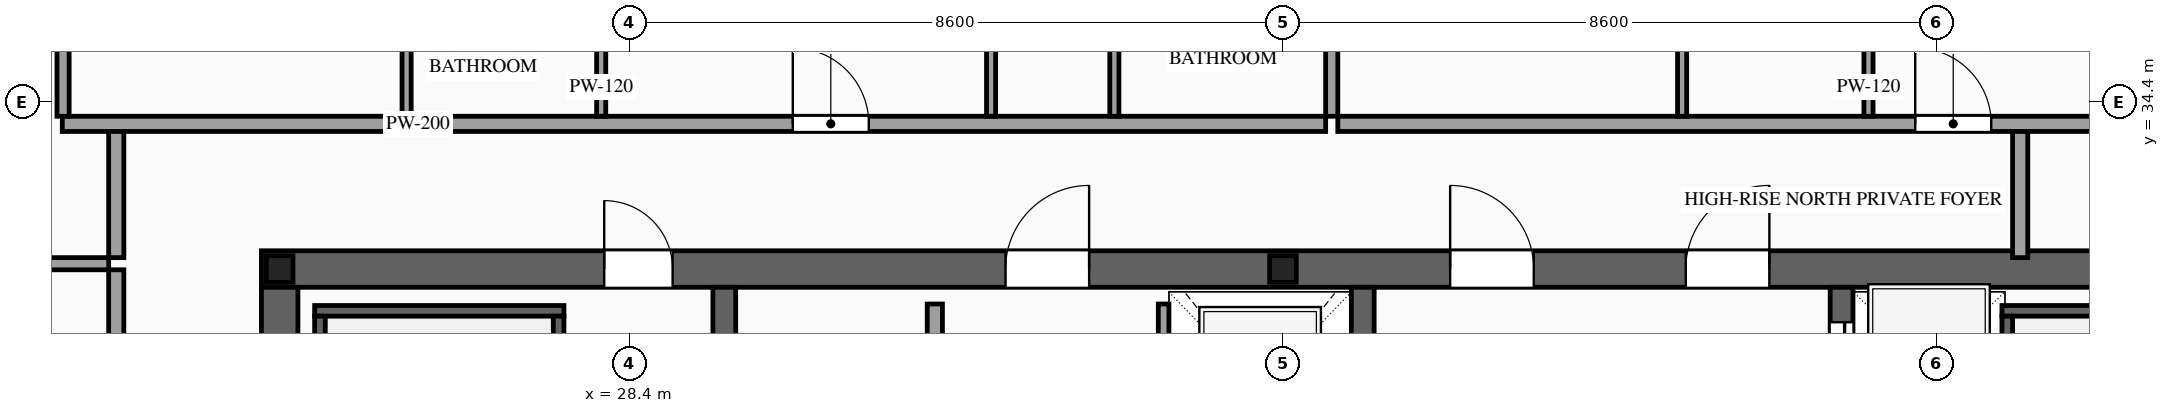
"""IFC4 building model, lengths in metres.
Left out: names, types, materials, properties, quantities, classifications, styles, units other than length and angle.
Written with IfcOpenShell. Run it as: python <this file> out.ifc"""

import sys

from ifc_helpers import new_model, si_unit, direction, frame, frame_2d, origin, origin_2d, place, context, subcontext, project, spatial, rectangle, i_section, extrude, source, transform, mapped, element, fill, save


model = new_model("IFC4")
c1 = context("Model", 3, precision=1e-05, world=origin(), true_north=direction((0.0, 1.0)))
c2 = subcontext(c1, "Body", "Model", "MODEL_VIEW")
j1 = project(units=[si_unit("LENGTHUNIT", "METRE"), si_unit("PLANEANGLEUNIT", "RADIAN")], contexts=[c1])
p1 = place(None, origin())
s1 = spatial("IfcSite", under=j1, at=p1, CompositionType="ELEMENT")
p2 = place(p1, origin())
s2 = spatial("IfcBuilding", under=s1, at=p2, CompositionType="ELEMENT")
p3 = place(p2, frame((0.0, 0.0, 292.6)))
s3 = spatial("IfcBuildingStorey", under=s2, at=p3, CompositionType="ELEMENT", Elevation=292.6)
p4 = place(p3, frame((23.56, 32.2, 0.0), z_axis=(0.0, 0.0, 1.0), x_axis=(1.0, 0.0, 0.0)))
e1 = element("IfcWall", 1, at=p4, inside=s3, PredefinedType="SHEAR", context=c2, shape_type="SweptSolid", body=[
    extrude(rectangle(XDim=26.88, YDim=0.48, at=frame_2d((13.44, 0.0))), origin(), (0.0, 0.0, 1.0), 3.5),
])
p5 = place(p4, frame((4.51, 0.0, 0.0)))
e2 = element("IfcOpeningElement", 2, at=p5, cuts=e1, PredefinedType="OPENING", context=c2, shape_type="SweptSolid", body=[
    extrude(rectangle(XDim=0.9, YDim=2.15, at=frame_2d((0.45, 1.075))), frame((0.0, 0.255, 0.0), z_axis=(0.0, -1.0, 0.0), x_axis=(1.0, 0.0, 0.0)), (0.0, 0.0, 1.0), 0.51),
])
p6 = place(p4, frame((9.79, 0.0, 0.0)))
e3 = element("IfcOpeningElement", 3, at=p6, cuts=e1, PredefinedType="OPENING", context=c2, shape_type="SweptSolid", body=[
    extrude(rectangle(XDim=1.1, YDim=2.2, at=frame_2d((0.55, 1.1))), frame((0.0, 0.255, 0.0), z_axis=(0.0, -1.0, 0.0), x_axis=(1.0, 0.0, 0.0)), (0.0, 0.0, 1.0), 0.51),
])
p7 = place(p4, frame((15.64, 0.0, 0.0)))
e4 = element("IfcOpeningElement", 4, at=p7, cuts=e1, PredefinedType="OPENING", context=c2, shape_type="SweptSolid", body=[
    extrude(rectangle(XDim=1.1, YDim=2.2, at=frame_2d((0.55, 1.1))), frame((0.0, 0.255, 0.0), z_axis=(0.0, -1.0, 0.0), x_axis=(1.0, 0.0, 0.0)), (0.0, 0.0, 1.0), 0.51),
])
p8 = place(p4, frame((18.74, 0.0, 0.0)))
e5 = element("IfcOpeningElement", 5, at=p8, cuts=e1, PredefinedType="OPENING", context=c2, shape_type="SweptSolid", body=[
    extrude(rectangle(XDim=1.1, YDim=2.2, at=frame_2d((0.55, 1.1))), frame((0.0, 0.255, 0.0), z_axis=(0.0, -1.0, 0.0), x_axis=(1.0, 0.0, 0.0)), (0.0, 0.0, 1.0), 0.51),
])
m1 = source(origin(), c2, "Body", "SweptSolid", [
    extrude(rectangle(XDim=12.32, YDim=0.48, at=frame_2d((6.16, 0.0))), origin(), (0.0, 0.0, 1.0), 3.5),
])
p9 = place(p3, frame((23.8, 19.64, 0.0), z_axis=(0.0, 0.0, 1.0), x_axis=(0.0, 1.0, 0.0)))
e6 = element("IfcWall", 6, at=p9, inside=s3, PredefinedType="SHEAR", context=c2, shape_type="MappedRepresentation", body=[
    mapped(m1, transform((0.0, 0.0, 0.0), scale=1.0)),
])
m2 = source(origin(), c2, "Body", "SweptSolid", [
    extrude(rectangle(XDim=12.32, YDim=0.3, at=frame_2d((6.16, 0.0))), origin(), (0.0, 0.0, 1.0), 3.5),
])
for number, where, z_axis, x_axis in (
    (7, (29.65, 19.64, 0.0), (0.0, 0.0, 1.0), (0.0, 1.0, 0.0)),
    (8, (38.05, 19.64, 0.0), (0.0, 0.0, 1.0), (0.0, 1.0, 0.0)),
):
    element("IfcWall", number, at=place(p3, frame(where, z_axis=z_axis, x_axis=x_axis)), inside=s3, PredefinedType="SOLIDWALL", context=c2, shape_type="MappedRepresentation", body=[
        mapped(m2, transform((0.0, 0.0, 0.0), scale=1.0)),
    ])
p10 = place(p3, frame((44.35, 19.64, 0.0), z_axis=(0.0, 0.0, 1.0), x_axis=(0.0, 1.0, 0.0)))
e9 = element("IfcWall", 9, at=p10, inside=s3, PredefinedType="SOLIDWALL", context=c2, shape_type="SweptSolid", body=[
    extrude(rectangle(XDim=12.32, YDim=0.3, at=frame_2d((6.16, 0.0))), origin(), (0.0, 0.0, 1.0), 3.5),
])
p11 = place(p10, frame((6.56, 0.0, 0.0)))
e10 = element("IfcOpeningElement", 10, at=p11, cuts=e9, PredefinedType="OPENING", context=c2, shape_type="SweptSolid", body=[
    extrude(rectangle(XDim=1.1, YDim=2.2, at=frame_2d((0.55, 1.1))), frame((0.0, 0.165, 0.0), z_axis=(0.0, -1.0, 0.0), x_axis=(1.0, 0.0, 0.0)), (0.0, 0.0, 1.0), 0.33),
])
p12 = place(p10, frame((8.66, 0.0, 0.0)))
e11 = element("IfcOpeningElement", 11, at=p12, cuts=e9, PredefinedType="OPENING", context=c2, shape_type="SweptSolid", body=[
    extrude(rectangle(XDim=1.1, YDim=2.2, at=frame_2d((0.55, 1.1))), frame((0.0, 0.165, 0.0), z_axis=(0.0, -1.0, 0.0), x_axis=(1.0, 0.0, 0.0)), (0.0, 0.0, 1.0), 0.33),
])
p13 = place(p10, frame((10.76, 0.0, 0.0)))
e12 = element("IfcOpeningElement", 12, at=p13, cuts=e9, PredefinedType="OPENING", context=c2, shape_type="SweptSolid", body=[
    extrude(rectangle(XDim=1.1, YDim=2.2, at=frame_2d((0.55, 1.1))), frame((0.0, 0.165, 0.0), z_axis=(0.0, -1.0, 0.0), x_axis=(1.0, 0.0, 0.0)), (0.0, 0.0, 1.0), 0.33),
])
m3 = source(origin(), c2, "Body", "SweptSolid", [
    extrude(i_section(OverallWidth=0.35, OverallDepth=0.35, WebThickness=0.012, FlangeThickness=0.019, at=origin_2d()), origin(), (0.0, 0.0, 1.0), 3.5),
])
for number, where, z_axis, x_axis in (
    (13, (23.8, 32.2, 0.0), (0.0, 0.0, 1.0), (1.0, 0.0, 0.0)),
    (14, (37.0, 32.2, 0.0), (0.0, 0.0, 1.0), (1.0, 0.0, 0.0)),
):
    element("IfcColumn", number, at=place(p3, frame(where, z_axis=z_axis, x_axis=x_axis)), inside=s3, PredefinedType="COLUMN", context=c2, shape_type="MappedRepresentation", body=[
        mapped(m3, transform((0.0, 0.0, 0.0), scale=1.0)),
    ])
p14 = place(p3, frame((35.43, 29.4, 0.0), z_axis=(0.0, 0.0, 1.0), x_axis=(0.0, 1.0, 0.0)))
e15 = element("IfcWall", 15, at=p14, inside=s3, PredefinedType="SOLIDWALL", context=c2, shape_type="SweptSolid", body=[
    extrude(rectangle(XDim=2.34, YDim=0.14, at=frame_2d((1.17, 0.0))), origin(), (0.0, 0.0, 1.0), 3.28),
])
p15 = place(p14, frame((0.62, 0.0, 0.0)))
e16 = element("IfcOpeningElement", 16, at=p15, cuts=e15, PredefinedType="OPENING", context=c2, shape_type="SweptSolid", body=[
    extrude(rectangle(XDim=1.1, YDim=2.2, at=frame_2d((0.55, 1.1))), frame((0.0, 0.085, 0.0), z_axis=(0.0, -1.0, 0.0), x_axis=(1.0, 0.0, 0.0)), (0.0, 0.0, 1.0), 0.17),
])
m4 = source(origin(), c2, "Body", "SweptSolid", [
    extrude(rectangle(XDim=3.28, YDim=0.14, at=frame_2d((1.64, 0.0))), origin(), (0.0, 0.0, 1.0), 3.28),
])
p16 = place(p3, frame((24.26, 31.65, 0.0), z_axis=(0.0, 0.0, 1.0), x_axis=(1.0, 0.0, 0.0)))
e17 = element("IfcWall", 17, at=p16, inside=s3, PredefinedType="SOLIDWALL", context=c2, shape_type="MappedRepresentation", body=[
    mapped(m4, transform((0.0, 0.0, 0.0), scale=1.0)),
])
m5 = source(origin(), c2, "Body", "SweptSolid", [
    extrude(rectangle(XDim=8.94, YDim=0.14, at=frame_2d((4.47, 0.0))), origin(), (0.0, 0.0, 1.0), 3.28),
])
for number, where, z_axis, x_axis in (
    (18, (24.33, 22.64, 0.0), (0.0, 0.0, 1.0), (0.0, 1.0, 0.0)),
    (19, (27.47, 22.64, 0.0), (0.0, 0.0, 1.0), (0.0, 1.0, 0.0)),
):
    element("IfcWall", number, at=place(p3, frame(where, z_axis=z_axis, x_axis=x_axis)), inside=s3, PredefinedType="SOLIDWALL", context=c2, shape_type="MappedRepresentation", body=[
        mapped(m5, transform((0.0, 0.0, 0.0), scale=1.0)),
    ])
p17 = place(p3, frame((46.46, 31.65, 0.0), z_axis=(0.0, 0.0, 1.0), x_axis=(1.0, 0.0, 0.0)))
e20 = element("IfcWall", 20, at=p17, inside=s3, PredefinedType="SOLIDWALL", context=c2, shape_type="MappedRepresentation", body=[
    mapped(m4, transform((0.0, 0.0, 0.0), scale=1.0)),
])
p18 = place(p3, frame((46.53, 22.64, 0.0), z_axis=(0.0, 0.0, 1.0), x_axis=(0.0, 1.0, 0.0)))
e21 = element("IfcWall", 21, at=p18, inside=s3, PredefinedType="SOLIDWALL", context=c2, shape_type="MappedRepresentation", body=[
    mapped(m5, transform((0.0, 0.0, 0.0), scale=1.0)),
])
p19 = place(p3, frame((32.42, 24.05, 0.0), z_axis=(0.0, 0.0, 1.0), x_axis=(0.0, 1.0, 0.0)))
e22 = element("IfcWall", 22, at=p19, inside=s3, PredefinedType="PARTITIONING", context=c2, shape_type="SweptSolid", body=[
    extrude(rectangle(XDim=7.69, YDim=0.2, at=frame_2d((3.845, 0.0))), origin(), (0.0, 0.0, 1.0), 3.28),
])
p20 = place(p19, frame((3.395, 0.0, 0.0)))
e23 = element("IfcOpeningElement", 23, at=p20, cuts=e22, PredefinedType="OPENING", context=c2, shape_type="SweptSolid", body=[
    extrude(rectangle(XDim=0.9, YDim=2.15, at=frame_2d((0.45, 1.075))), frame((0.0, 0.115, 0.0), z_axis=(0.0, -1.0, 0.0), x_axis=(1.0, 0.0, 0.0)), (0.0, 0.0, 1.0), 0.23),
])
m6 = source(origin(), c2, "Body", "SweptSolid", [
    extrude(rectangle(XDim=1.7, YDim=0.2, at=frame_2d((0.85, 0.0))), origin(), (0.0, 0.0, 1.0), 3.28),
])
for number, where, z_axis, x_axis in (
    (24, (21.65, 32.35, 0.0), (0.0, 0.0, 1.0), (0.0, 1.0, 0.0)),
    (25, (46.7, 32.35, 0.0), (0.0, 0.0, 1.0), (0.0, 1.0, 0.0)),
):
    element("IfcWall", number, at=place(p3, frame(where, z_axis=z_axis, x_axis=x_axis)), inside=s3, PredefinedType="PARTITIONING", context=c2, shape_type="MappedRepresentation", body=[
        mapped(m6, transform((0.0, 0.0, 0.0), scale=1.0)),
    ])
p21 = place(p3, frame((20.94, 34.11, 0.0), z_axis=(0.0, 0.0, 1.0), x_axis=(1.0, 0.0, 0.0)))
e26 = element("IfcWall", 26, at=p21, inside=s3, PredefinedType="PARTITIONING", context=c2, shape_type="SweptSolid", body=[
    extrude(rectangle(XDim=16.622, YDim=0.2, at=frame_2d((8.311, 0.0))), origin(), (0.0, 0.0, 1.0), 3.28),
])
p22 = place(p21, frame((9.611, 0.0, 0.0)))
e27 = element("IfcOpeningElement", 27, at=p22, cuts=e26, PredefinedType="OPENING", context=c2, shape_type="SweptSolid", body=[
    extrude(rectangle(XDim=1.0, YDim=2.2, at=frame_2d((0.5, 1.1))), frame((0.0, 0.115, 0.0), z_axis=(0.0, -1.0, 0.0), x_axis=(1.0, 0.0, 0.0)), (0.0, 0.0, 1.0), 0.23),
])
m7 = source(origin(), c2, "Body", "SweptSolid", [
    extrude(rectangle(XDim=10.54, YDim=0.16, at=frame_2d((5.27, 0.0))), origin(), (0.0, 0.0, 1.0), 3.28),
])
p23 = place(p3, frame((37.642, 34.21, 0.0), z_axis=(0.0, 0.0, 1.0), x_axis=(0.0, 1.0, 0.0)))
e28 = element("IfcWall", 28, at=p23, inside=s3, PredefinedType="PARTITIONING", context=c2, shape_type="MappedRepresentation", body=[
    mapped(m7, transform((0.0, 0.0, 0.0), scale=1.0)),
])
m8 = source(origin(), c2, "Body", "SweptSolid", [
    extrude(rectangle(XDim=2.9, YDim=0.12, at=frame_2d((1.45, 0.0))), origin(), (0.0, 0.0, 1.0), 3.28),
])
p24 = place(p3, frame((25.47, 34.21, 0.0), z_axis=(0.0, 0.0, 1.0), x_axis=(0.0, 1.0, 0.0)))
e29 = element("IfcWall", 29, at=p24, inside=s3, PredefinedType="PARTITIONING", context=c2, shape_type="MappedRepresentation", body=[
    mapped(m8, transform((0.0, 0.0, 0.0), scale=1.0)),
])
p25 = place(p3, frame((28.03, 34.21, 0.0), z_axis=(0.0, 0.0, 1.0), x_axis=(0.0, 1.0, 0.0)))
e30 = element("IfcWall", 30, at=p25, inside=s3, PredefinedType="PARTITIONING", context=c2, shape_type="SweptSolid", body=[
    extrude(rectangle(XDim=2.9, YDim=0.12, at=frame_2d((1.45, 0.0))), origin(), (0.0, 0.0, 1.0), 3.28),
])
p26 = place(p25, frame((1.025, 0.0, 0.0)))
e31 = element("IfcOpeningElement", 31, at=p26, cuts=e30, PredefinedType="OPENING", context=c2, shape_type="SweptSolid", body=[
    extrude(rectangle(XDim=0.85, YDim=2.1, at=frame_2d((0.425, 1.05))), frame((0.0, 0.075, 0.0), z_axis=(0.0, -1.0, 0.0), x_axis=(1.0, 0.0, 0.0)), (0.0, 0.0, 1.0), 0.15),
])
for number, where, z_axis, x_axis in (
    (32, (34.782, 34.21, 0.0), (0.0, 0.0, 1.0), (0.0, 1.0, 0.0)),
    (33, (33.16, 34.21, 0.0), (0.0, 0.0, 1.0), (0.0, 1.0, 0.0)),
):
    element("IfcWall", number, at=place(p3, frame(where, z_axis=z_axis, x_axis=x_axis)), inside=s3, PredefinedType="PARTITIONING", context=c2, shape_type="MappedRepresentation", body=[
        mapped(m8, transform((0.0, 0.0, 0.0), scale=1.0)),
    ])
p27 = place(p3, frame((37.722, 34.11, 0.0), z_axis=(0.0, 0.0, 1.0), x_axis=(1.0, 0.0, 0.0)))
e34 = element("IfcWall", 34, at=p27, inside=s3, PredefinedType="PARTITIONING", context=c2, shape_type="SweptSolid", body=[
    extrude(rectangle(XDim=15.338, YDim=0.2, at=frame_2d((7.669, 0.0))), origin(), (0.0, 0.0, 1.0), 3.28),
])
p28 = place(p27, frame((7.597, 0.0, 0.0)))
e35 = element("IfcOpeningElement", 35, at=p28, cuts=e34, PredefinedType="OPENING", context=c2, shape_type="SweptSolid", body=[
    extrude(rectangle(XDim=1.0, YDim=2.2, at=frame_2d((0.5, 1.1))), frame((0.0, 0.115, 0.0), z_axis=(0.0, -1.0, 0.0), x_axis=(1.0, 0.0, 0.0)), (0.0, 0.0, 1.0), 0.23),
])
m9 = source(origin(), c2, "Body", "SweptSolid", [
    extrude(rectangle(XDim=10.39, YDim=0.16, at=frame_2d((5.195, 0.0))), origin(), (0.0, 0.0, 1.0), 3.28),
])
p29 = place(p3, frame((20.95, 34.21, 0.0), z_axis=(0.0, 0.0, 1.0), x_axis=(0.0, 1.0, 0.0)))
e36 = element("IfcWall", 36, at=p29, inside=s3, PredefinedType="PARTITIONING", context=c2, shape_type="MappedRepresentation", body=[
    mapped(m9, transform((0.0, 0.0, 0.0), scale=1.0)),
])
p30 = place(p3, frame((42.252, 34.21, 0.0), z_axis=(0.0, 0.0, 1.0), x_axis=(0.0, 1.0, 0.0)))
e37 = element("IfcWall", 37, at=p30, inside=s3, PredefinedType="PARTITIONING", context=c2, shape_type="MappedRepresentation", body=[
    mapped(m8, transform((0.0, 0.0, 0.0), scale=1.0)),
])
p31 = place(p3, frame((44.704, 34.21, 0.0), z_axis=(0.0, 0.0, 1.0), x_axis=(0.0, 1.0, 0.0)))
e38 = element("IfcWall", 38, at=p31, inside=s3, PredefinedType="PARTITIONING", context=c2, shape_type="SweptSolid", body=[
    extrude(rectangle(XDim=2.9, YDim=0.12, at=frame_2d((1.45, 0.0))), origin(), (0.0, 0.0, 1.0), 3.28),
])
p32 = place(p31, frame((1.025, 0.0, 0.0)))
e39 = element("IfcOpeningElement", 39, at=p32, cuts=e38, PredefinedType="OPENING", context=c2, shape_type="SweptSolid", body=[
    extrude(rectangle(XDim=0.85, YDim=2.1, at=frame_2d((0.425, 1.05))), frame((0.0, 0.075, 0.0), z_axis=(0.0, -1.0, 0.0), x_axis=(1.0, 0.0, 0.0)), (0.0, 0.0, 1.0), 0.15),
])
p33 = place(p3, frame((21.65, 19.41, 0.0), z_axis=(0.0, 0.0, 1.0), x_axis=(0.0, 1.0, 0.0)))
e40 = element("IfcWall", 40, at=p33, inside=s3, PredefinedType="PARTITIONING", context=c2, shape_type="SweptSolid", body=[
    extrude(rectangle(XDim=12.78, YDim=0.2, at=frame_2d((6.39, 0.0))), origin(), (0.0, 0.0, 1.0), 3.28),
])
p34 = place(p33, frame((5.89, 0.0, 0.0)))
e41 = element("IfcOpeningElement", 41, at=p34, cuts=e40, PredefinedType="OPENING", context=c2, shape_type="SweptSolid", body=[
    extrude(rectangle(XDim=1.0, YDim=2.2, at=frame_2d((0.5, 1.1))), frame((0.0, 0.115, 0.0), z_axis=(0.0, -1.0, 0.0), x_axis=(1.0, 0.0, 0.0)), (0.0, 0.0, 1.0), 0.23),
])
m10 = source(origin(), c2, "Body", "SweptSolid", [
    extrude(rectangle(XDim=3.5, YDim=0.16, at=frame_2d((1.75, 0.0))), origin(), (0.0, 0.0, 1.0), 2.825),
])
p35 = place(p3, frame((18.05, 32.27, 0.0), z_axis=(0.0, 0.0, 1.0), x_axis=(1.0, 0.0, 0.0)))
e42 = element("IfcWall", 42, at=p35, inside=s3, PredefinedType="PARTITIONING", context=c2, shape_type="MappedRepresentation", body=[
    mapped(m10, transform((0.0, 0.0, 0.0), scale=1.0)),
])
m11 = source(origin(), c2, "Body", "SweptSolid", [
    extrude(rectangle(XDim=1.1, YDim=2.2, at=frame_2d((0.55, 1.1))), frame((0.0, 0.025, 0.0), z_axis=(0.0, -1.0, 0.0), x_axis=(1.0, 0.0, 0.0)), (0.0, 0.0, 1.0), 0.05),
])
p36 = place(p13, origin())
e43 = element("IfcDoor", 43, at=p36, inside=s3, OperationType="SLIDING_TO_LEFT", PredefinedType="DOOR", context=c2, shape_type="MappedRepresentation", body=[
    mapped(m11, transform((0.0, 0.0, 0.0), scale=1.0)),
])
fill(e12, e43)
m12 = source(origin(), c2, "Body", "SweptSolid", [
    extrude(rectangle(XDim=0.9, YDim=2.15, at=frame_2d((0.45, 1.075))), frame((0.0, 0.025, 0.0), z_axis=(0.0, -1.0, 0.0), x_axis=(1.0, 0.0, 0.0)), (0.0, 0.0, 1.0), 0.05),
])
p37 = place(p5, origin())
e44 = element("IfcDoor", 44, at=p37, inside=s3, OperationType="SINGLE_SWING_LEFT", PredefinedType="DOOR", context=c2, shape_type="MappedRepresentation", body=[
    mapped(m12, transform((0.0, 0.0, 0.0), scale=1.0)),
])
fill(e2, e44)
m13 = source(origin(), c2, "Body", "SweptSolid", [
    extrude(rectangle(XDim=1.1, YDim=2.2, at=frame_2d((0.55, 1.1))), frame((0.0, 0.025, 0.0), z_axis=(0.0, -1.0, 0.0), x_axis=(1.0, 0.0, 0.0)), (0.0, 0.0, 1.0), 0.05),
])
p38 = place(p6, origin())
e45 = element("IfcDoor", 45, at=p38, inside=s3, OperationType="SINGLE_SWING_RIGHT", PredefinedType="DOOR", context=c2, shape_type="MappedRepresentation", body=[
    mapped(m13, transform((0.0, 0.0, 0.0), scale=1.0)),
])
fill(e3, e45)
p39 = place(p7, origin())
e46 = element("IfcDoor", 46, at=p39, inside=s3, OperationType="SINGLE_SWING_LEFT", PredefinedType="DOOR", context=c2, shape_type="MappedRepresentation", body=[
    mapped(m13, transform((0.0, 0.0, 0.0), scale=1.0)),
])
fill(e4, e46)
p40 = place(p8, origin())
e47 = element("IfcDoor", 47, at=p40, inside=s3, OperationType="SINGLE_SWING_RIGHT", PredefinedType="DOOR", context=c2, shape_type="MappedRepresentation", body=[
    mapped(m13, transform((0.0, 0.0, 0.0), scale=1.0)),
])
fill(e5, e47)
m14 = source(origin(), c2, "Body", "SweptSolid", [
    extrude(rectangle(XDim=1.0, YDim=2.2, at=frame_2d((0.5, 1.1))), frame((0.0, 0.025, 0.0), z_axis=(0.0, -1.0, 0.0), x_axis=(1.0, 0.0, 0.0)), (0.0, 0.0, 1.0), 0.05),
])
p41 = place(p22, origin())
e48 = element("IfcDoor", 48, at=p41, inside=s3, OperationType="SINGLE_SWING_LEFT", PredefinedType="DOOR", context=c2, shape_type="MappedRepresentation", body=[
    mapped(m14, transform((0.0, 0.0, 0.0), scale=1.0)),
])
fill(e27, e48)
p42 = place(p28, origin())
e49 = element("IfcDoor", 49, at=p42, inside=s3, OperationType="SINGLE_SWING_LEFT", PredefinedType="DOOR", context=c2, shape_type="MappedRepresentation", body=[
    mapped(m14, transform((0.0, 0.0, 0.0), scale=1.0)),
])
fill(e35, e49)
save(model, sys.argv[1])
